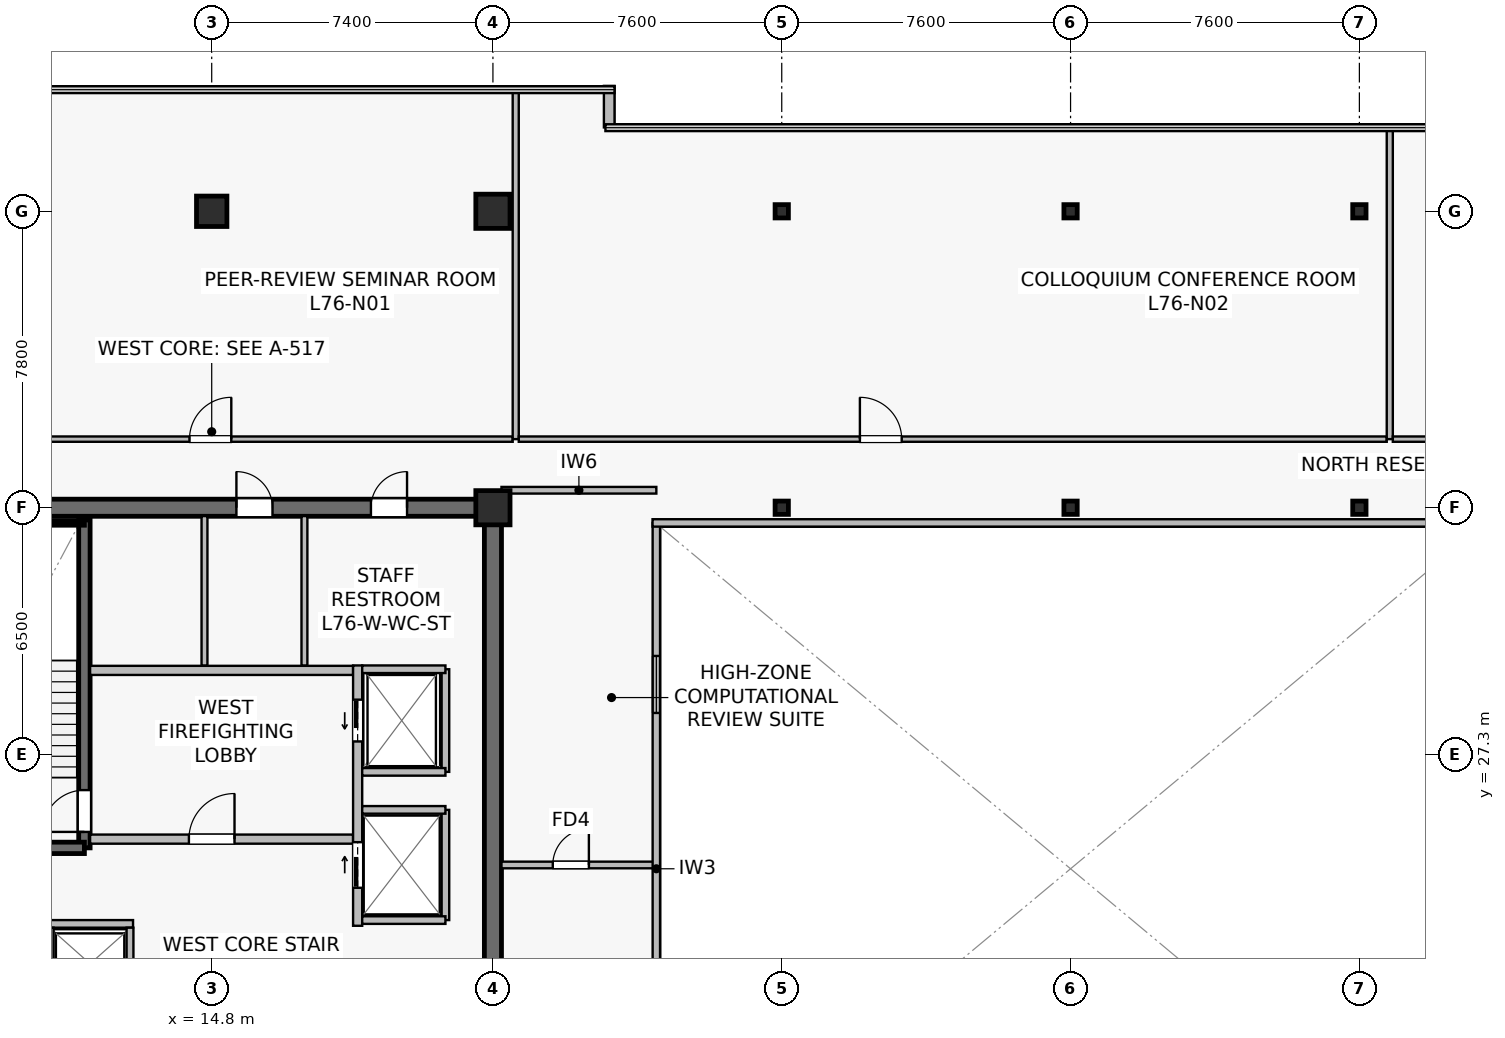
"""IFC4 building model, lengths in metres.
Left out: names, types, materials, properties, quantities, classifications, styles, units other than length and angle.
Written with IfcOpenShell. Run it as: python <this file> out.ifc"""

import sys

from ifc_helpers import new_model, si_unit, direction, frame, frame_2d, origin, origin_2d, place, context, subcontext, project, spatial, rectangle, i_section, extrude, source, transform, mapped, element, fill, save


model = new_model("IFC4")
c1 = context("Model", 3, precision=1e-05, world=origin(), true_north=direction((0.0, 1.0)))
c2 = subcontext(c1, "Body", "Model", "MODEL_VIEW")
j1 = project(units=[si_unit("LENGTHUNIT", "METRE"), si_unit("PLANEANGLEUNIT", "RADIAN")], contexts=[c1])
p1 = place(None, origin())
s1 = spatial("IfcSite", under=j1, at=p1, CompositionType="ELEMENT")
p2 = place(p1, origin())
s2 = spatial("IfcBuilding", under=s1, at=p2, CompositionType="ELEMENT")
p3 = place(p2, frame((0.0, 0.0, 318.6)))
s3 = spatial("IfcBuildingStorey", under=s2, at=p3, CompositionType="ELEMENT", Elevation=318.6)
p4 = place(p3, frame((7.175, 33.8, 0.0), z_axis=(0.0, 0.0, 1.0), x_axis=(1.0, 0.0, 0.0)))
e1 = element("IfcWall", 1, at=p4, inside=s3, PredefinedType="SHEAR", context=c2, shape_type="SweptSolid", body=[
    extrude(rectangle(XDim=15.25, YDim=0.45, at=frame_2d((7.625, 0.0))), origin(), (0.0, 0.0, 1.0), 3.9),
])
p5 = place(p4, frame((8.275, 0.0, 0.0)))
e2 = element("IfcOpeningElement", 2, at=p5, cuts=e1, PredefinedType="OPENING", context=c2, shape_type="SweptSolid", body=[
    extrude(rectangle(XDim=0.95, YDim=2.15, at=frame_2d((0.475, 1.075))), frame((0.0, 0.235, 0.0), z_axis=(0.0, -1.0, 0.0), x_axis=(1.0, 0.0, 0.0)), (0.0, 0.0, 1.0), 0.47),
])
p6 = place(p4, frame((11.815, 0.0, 0.0)))
e3 = element("IfcOpeningElement", 3, at=p6, cuts=e1, PredefinedType="OPENING", context=c2, shape_type="SweptSolid", body=[
    extrude(rectangle(XDim=0.95, YDim=2.15, at=frame_2d((0.475, 1.075))), frame((0.0, 0.235, 0.0), z_axis=(0.0, -1.0, 0.0), x_axis=(1.0, 0.0, 0.0)), (0.0, 0.0, 1.0), 0.47),
])
p7 = place(p3, frame((22.2, 15.025, 0.0), z_axis=(0.0, 0.0, 1.0), x_axis=(0.0, 1.0, 0.0)))
e4 = element("IfcWall", 4, at=p7, inside=s3, PredefinedType="SHEAR", context=c2, shape_type="SweptSolid", body=[
    extrude(rectangle(XDim=18.55, YDim=0.45, at=frame_2d((9.275, 0.0))), origin(), (0.0, 0.0, 1.0), 3.9),
])
p8 = place(p7, frame((3.525, 0.0, 0.0)))
e5 = element("IfcOpeningElement", 5, at=p8, cuts=e4, PredefinedType="OPENING", context=c2, shape_type="SweptSolid", body=[
    extrude(rectangle(XDim=1.42, YDim=2.2, at=frame_2d((0.71, 1.1))), frame((0.0, 0.235, 0.0), z_axis=(0.0, -1.0, 0.0), x_axis=(1.0, 0.0, 0.0)), (0.0, 0.0, 1.0), 0.47),
])
p9 = place(p3, frame((11.45, 24.85, 0.0), z_axis=(0.0, 0.0, 1.0), x_axis=(0.0, 1.0, 0.0)))
e6 = element("IfcWall", 6, at=p9, inside=s3, PredefinedType="SHEAR", context=c2, shape_type="SweptSolid", body=[
    extrude(rectangle(XDim=8.63, YDim=0.3, at=frame_2d((4.315, 0.0))), origin(), (0.0, 0.0, 1.0), 3.9),
])
p10 = place(p9, frame((0.42, 0.0, 0.0)))
e7 = element("IfcOpeningElement", 7, at=p10, cuts=e6, PredefinedType="OPENING", context=c2, shape_type="SweptSolid", body=[
    extrude(rectangle(XDim=1.1, YDim=2.15, at=frame_2d((0.55, 1.075))), frame((0.0, 0.16, 0.0), z_axis=(0.0, -1.0, 0.0), x_axis=(1.0, 0.0, 0.0)), (0.0, 0.0, 1.0), 0.32),
])
p11 = place(p3, frame((7.65, 24.85, 0.0), z_axis=(0.0, 0.0, 1.0), x_axis=(1.0, 0.0, 0.0)))
e8 = element("IfcWall", 8, at=p11, inside=s3, PredefinedType="SHEAR", context=c2, shape_type="SweptSolid", body=[
    extrude(rectangle(XDim=3.8, YDim=0.3, at=frame_2d((1.9, 0.0))), origin(), (0.0, 0.0, 1.0), 3.9),
])
p12 = place(p3, frame((7.73, 33.4, 0.0), z_axis=(0.0, 0.0, 1.0), x_axis=(1.0, 0.0, 0.0)))
e9 = element("IfcWall", 9, at=p12, inside=s3, PredefinedType="SOLIDWALL", context=c2, shape_type="SweptSolid", body=[
    extrude(rectangle(XDim=3.72, YDim=0.12, at=frame_2d((1.86, 0.0))), origin(), (0.0, 0.0, 1.0), 3.9),
])
m1 = source(origin(), c2, "Body", "SweptSolid", [
    extrude(rectangle(XDim=0.9, YDim=0.9, at=origin_2d()), origin(), (0.0, 0.0, 1.0), 4.2),
])
p13 = place(p3, frame((22.2, 33.8, 0.0), z_axis=(0.0, 0.0, 1.0), x_axis=(1.0, 0.0, 0.0)))
e10 = element("IfcColumn", 10, at=p13, inside=s3, PredefinedType="COLUMN", context=c2, shape_type="MappedRepresentation", body=[
    mapped(m1, transform((0.0, 0.0, 0.0), scale=1.0)),
])
m2 = source(origin(), c2, "Body", "SweptSolid", [
    extrude(rectangle(XDim=0.8, YDim=0.8, at=origin_2d()), origin(), (0.0, 0.0, 1.0), 4.2),
])
p14 = place(p3, frame((14.8, 41.6, 0.0), z_axis=(0.0, 0.0, 1.0), x_axis=(1.0, 0.0, 0.0)))
e11 = element("IfcColumn", 11, at=p14, inside=s3, PredefinedType="COLUMN", context=c2, shape_type="MappedRepresentation", body=[
    mapped(m2, transform((0.0, 0.0, 0.0), scale=1.0)),
])
p15 = place(p3, frame((22.2, 41.6, 0.0), z_axis=(0.0, 0.0, 1.0), x_axis=(1.0, 0.0, 0.0)))
e12 = element("IfcColumn", 12, at=p15, inside=s3, PredefinedType="COLUMN", context=c2, shape_type="MappedRepresentation", body=[
    mapped(m1, transform((0.0, 0.0, 0.0), scale=1.0)),
])
m3 = source(origin(), c2, "Body", "SweptSolid", [
    extrude(i_section(OverallWidth=0.35, OverallDepth=0.35, WebThickness=0.012, FlangeThickness=0.019, at=origin_2d()), origin(), (0.0, 0.0, 1.0), 4.2),
])
for number, where, z_axis, x_axis in (
    (13, (29.8, 33.8, 0.0), (0.0, 0.0, 1.0), (1.0, 0.0, 0.0)),
    (14, (29.8, 41.6, 0.0), (0.0, 0.0, 1.0), (1.0, 0.0, 0.0)),
    (15, (37.4, 33.8, 0.0), (0.0, 0.0, 1.0), (1.0, 0.0, 0.0)),
    (16, (37.4, 41.6, 0.0), (0.0, 0.0, 1.0), (1.0, 0.0, 0.0)),
    (17, (45.0, 33.8, 0.0), (0.0, 0.0, 1.0), (1.0, 0.0, 0.0)),
    (18, (45.0, 41.6, 0.0), (0.0, 0.0, 1.0), (1.0, 0.0, 0.0)),
):
    element("IfcColumn", number, at=place(p3, frame(where, z_axis=z_axis, x_axis=x_axis)), inside=s3, PredefinedType="COLUMN", context=c2, shape_type="MappedRepresentation", body=[
        mapped(m3, transform((0.0, 0.0, 0.0), scale=1.0)),
    ])
p16 = place(p3, frame((25.26, 43.807, 0.0), z_axis=(0.0, 0.0, 1.0), x_axis=(0.0, 1.0, 0.0)))
e19 = element("IfcWall", 19, at=p16, inside=s3, PredefinedType="STANDARD", context=c2, shape_type="SweptSolid", body=[
    extrude(rectangle(XDim=1.093, YDim=0.28, at=frame_2d((0.546, 0.0))), origin(), (0.0, 0.0, 1.0), 3.9),
])
p17 = place(p3, frame((11.6, 25.08, 0.0), z_axis=(0.0, 0.0, 1.0), x_axis=(1.0, 0.0, 0.0)))
e20 = element("IfcWall", 20, at=p17, inside=s3, PredefinedType="SOLIDWALL", context=c2, shape_type="SweptSolid", body=[
    extrude(rectangle(XDim=6.92, YDim=0.24, at=frame_2d((3.46, 0.0))), origin(), (0.0, 0.0, 1.0), 3.297),
])
p18 = place(p17, frame((2.6, 0.0, 0.0)))
e21 = element("IfcOpeningElement", 21, at=p18, cuts=e20, PredefinedType="OPENING", context=c2, shape_type="SweptSolid", body=[
    extrude(rectangle(XDim=1.2, YDim=2.16, at=frame_2d((0.6, 1.08))), frame((0.0, 0.13, 0.0), z_axis=(0.0, -1.0, 0.0), x_axis=(1.0, 0.0, 0.0)), (0.0, 0.0, 1.0), 0.26),
])
p19 = place(p3, frame((11.6, 29.52, 0.0), z_axis=(0.0, 0.0, 1.0), x_axis=(1.0, 0.0, 0.0)))
e22 = element("IfcWall", 22, at=p19, inside=s3, PredefinedType="SOLIDWALL", context=c2, shape_type="SweptSolid", body=[
    extrude(rectangle(XDim=6.92, YDim=0.24, at=frame_2d((3.46, 0.0))), origin(), (0.0, 0.0, 1.0), 3.297),
])
p20 = place(p3, frame((18.64, 22.8, 0.0), z_axis=(0.0, 0.0, 1.0), x_axis=(0.0, 1.0, 0.0)))
e23 = element("IfcWall", 23, at=p20, inside=s3, PredefinedType="SOLIDWALL", context=c2, shape_type="SweptSolid", body=[
    extrude(rectangle(XDim=6.85, YDim=0.24, at=frame_2d((3.425, 0.0))), origin(), (0.0, 0.0, 1.0), 3.035),
])
p21 = place(p20, frame((4.85, 0.0, 0.0)))
e24 = element("IfcOpeningElement", 24, at=p21, cuts=e23, PredefinedType="OPENING", context=c2, shape_type="SweptSolid", body=[
    extrude(rectangle(XDim=1.1, YDim=2.22, at=frame_2d((0.55, 1.11))), frame((0.0, 0.13, 0.0), z_axis=(0.0, -1.0, 0.0), x_axis=(1.0, 0.0, 0.0)), (0.0, 0.0, 1.0), 0.26),
])
p22 = place(p20, frame((1.0, 0.0, 0.0)))
e25 = element("IfcOpeningElement", 25, at=p22, cuts=e23, PredefinedType="OPENING", context=c2, shape_type="SweptSolid", body=[
    extrude(rectangle(XDim=1.2, YDim=2.22, at=frame_2d((0.6, 1.11))), frame((0.0, 0.13, 0.0), z_axis=(0.0, -1.0, 0.0), x_axis=(1.0, 0.0, 0.0)), (0.0, 0.0, 1.0), 0.26),
])
p23 = place(p3, frame((10.47, 22.85, 0.0), z_axis=(0.0, 0.0, 1.0), x_axis=(1.0, 0.0, 0.0)))
e26 = element("IfcWall", 26, at=p23, inside=s3, PredefinedType="SOLIDWALL", context=c2, shape_type="SweptSolid", body=[
    extrude(rectangle(XDim=2.26, YDim=0.2, at=frame_2d((1.13, 0.0))), origin(), (0.0, 0.0, 1.0), 3.9),
])
for number, where, z_axis, x_axis in (
    (27, (10.55, 20.85, 0.0), (0.0, 0.0, 1.0), (0.0, 1.0, 0.0)),
    (28, (12.65, 20.85, 0.0), (0.0, 0.0, 1.0), (0.0, 1.0, 0.0)),
):
    element("IfcWall", number, at=place(p3, frame(where, z_axis=z_axis, x_axis=x_axis)), inside=s3, PredefinedType="SOLIDWALL", context=c2, shape_type="SweptSolid", body=[
        extrude(rectangle(XDim=1.9, YDim=0.18, at=frame_2d((0.95, 0.0))), origin(), (0.0, 0.0, 1.0), 3.9),
    ])
p24 = place(p3, frame((20.95, 26.85, 0.0), z_axis=(0.0, 0.0, 1.0), x_axis=(0.0, 1.0, 0.0)))
e29 = element("IfcWall", 29, at=p24, inside=s3, PredefinedType="SOLIDWALL", context=c2, shape_type="SweptSolid", body=[
    extrude(rectangle(XDim=2.7, YDim=0.2, at=frame_2d((1.35, 0.0))), origin(), (0.0, 0.0, 1.0), 3.9),
])
p25 = place(p3, frame((18.76, 29.55, 0.0), z_axis=(0.0, 0.0, 1.0), x_axis=(1.0, 0.0, 0.0)))
e30 = element("IfcWall", 30, at=p25, inside=s3, PredefinedType="SOLIDWALL", context=c2, shape_type="SweptSolid", body=[
    extrude(rectangle(XDim=2.19, YDim=0.2, at=frame_2d((1.095, 0.0))), origin(), (0.0, 0.0, 1.0), 3.9),
])
p26 = place(p3, frame((18.76, 26.85, 0.0), z_axis=(0.0, 0.0, 1.0), x_axis=(1.0, 0.0, 0.0)))
e31 = element("IfcWall", 31, at=p26, inside=s3, PredefinedType="SOLIDWALL", context=c2, shape_type="SweptSolid", body=[
    extrude(rectangle(XDim=2.19, YDim=0.2, at=frame_2d((1.095, 0.0))), origin(), (0.0, 0.0, 1.0), 3.297),
])
p27 = place(p3, frame((20.95, 22.95, 0.0), z_axis=(0.0, 0.0, 1.0), x_axis=(0.0, 1.0, 0.0)))
e32 = element("IfcWall", 32, at=p27, inside=s3, PredefinedType="SOLIDWALL", context=c2, shape_type="SweptSolid", body=[
    extrude(rectangle(XDim=2.9, YDim=0.2, at=frame_2d((1.45, 0.0))), origin(), (0.0, 0.0, 1.0), 3.035),
])
for number, where, z_axis, x_axis in (
    (33, (18.76, 25.85, 0.0), (0.0, 0.0, 1.0), (1.0, 0.0, 0.0)),
    (34, (18.76, 22.95, 0.0), (0.0, 0.0, 1.0), (1.0, 0.0, 0.0)),
):
    element("IfcWall", number, at=place(p3, frame(where, z_axis=z_axis, x_axis=x_axis)), inside=s3, PredefinedType="SOLIDWALL", context=c2, shape_type="SweptSolid", body=[
        extrude(rectangle(XDim=2.19, YDim=0.2, at=frame_2d((1.095, 0.0))), origin(), (0.0, 0.0, 1.0), 3.9),
    ])
p28 = place(p3, frame((14.61, 29.65, 0.0), z_axis=(0.0, 0.0, 1.0), x_axis=(0.0, 1.0, 0.0)))
e35 = element("IfcWall", 35, at=p28, inside=s3, PredefinedType="PLUMBINGWALL", context=c2, shape_type="SweptSolid", body=[
    extrude(rectangle(XDim=3.93, YDim=0.155, at=frame_2d((1.965, 0.0))), origin(), (0.0, 0.0, 1.0), 3.297),
])
p29 = place(p3, frame((17.24, 29.65, 0.0), z_axis=(0.0, 0.0, 1.0), x_axis=(0.0, 1.0, 0.0)))
e36 = element("IfcWall", 36, at=p29, inside=s3, PredefinedType="PLUMBINGWALL", context=c2, shape_type="SweptSolid", body=[
    extrude(rectangle(XDim=3.93, YDim=0.155, at=frame_2d((1.965, 0.0))), origin(), (0.0, 0.0, 1.0), 3.9),
])
p30 = place(p3, frame((22.425, 34.26, 0.0), z_axis=(0.0, 0.0, 1.0), x_axis=(1.0, 0.0, 0.0)))
e37 = element("IfcWall", 37, at=p30, inside=s3, PredefinedType="PARTITIONING", context=c2, shape_type="SweptSolid", body=[
    extrude(rectangle(XDim=4.075, YDim=0.175, at=frame_2d((2.038, 0.0))), origin(), (0.0, 0.0, 1.0), 3.635),
])
p31 = place(p3, frame((22.425, 24.4, 0.0), z_axis=(0.0, 0.0, 1.0), x_axis=(1.0, 0.0, 0.0)))
e38 = element("IfcWall", 38, at=p31, inside=s3, PredefinedType="PARTITIONING", context=c2, shape_type="SweptSolid", body=[
    extrude(rectangle(XDim=4.075, YDim=0.175, at=frame_2d((2.038, 0.0))), origin(), (0.0, 0.0, 1.0), 3.9),
])
p32 = place(p31, frame((1.35, 0.0, 0.0)))
e39 = element("IfcOpeningElement", 39, at=p32, cuts=e38, PredefinedType="OPENING", context=c2, shape_type="SweptSolid", body=[
    extrude(rectangle(XDim=0.95, YDim=2.15, at=frame_2d((0.475, 1.075))), frame((0.0, 0.098, 0.0), z_axis=(0.0, -1.0, 0.0), x_axis=(1.0, 0.0, 0.0)), (0.0, 0.0, 1.0), 0.195),
])
p33 = place(p3, frame((26.5, 15.2, 0.0), z_axis=(0.0, 0.0, 1.0), x_axis=(0.0, 1.0, 0.0)))
e40 = element("IfcWall", 40, at=p33, inside=s3, PredefinedType="SOLIDWALL", context=c2, shape_type="SweptSolid", body=[
    extrude(rectangle(XDim=18.2, YDim=0.195, at=frame_2d((9.1, 0.0))), origin(), (0.0, 0.0, 1.0), 3.9),
])
p34 = place(p33, frame((1.8, 0.0, 0.9)))
e41 = element("IfcOpeningElement", 41, at=p34, cuts=e40, PredefinedType="OPENING", context=c2, shape_type="SweptSolid", body=[
    extrude(rectangle(XDim=1.5, YDim=1.4, at=frame_2d((0.75, 0.7))), frame((0.0, 0.107, 0.0), z_axis=(0.0, -1.0, 0.0), x_axis=(1.0, 0.0, 0.0)), (0.0, 0.0, 1.0), 0.215),
])
p35 = place(p33, frame((13.2, 0.0, 0.9)))
e42 = element("IfcOpeningElement", 42, at=p35, cuts=e40, PredefinedType="OPENING", context=c2, shape_type="SweptSolid", body=[
    extrude(rectangle(XDim=1.5, YDim=1.4, at=frame_2d((0.75, 0.7))), frame((0.0, 0.107, 0.0), z_axis=(0.0, -1.0, 0.0), x_axis=(1.0, 0.0, 0.0)), (0.0, 0.0, 1.0), 0.215),
])
p36 = place(p3, frame((26.4, 33.4, 0.0), z_axis=(0.0, 0.0, 1.0), x_axis=(1.0, 0.0, 0.0)))
e43 = element("IfcWall", 43, at=p36, inside=s3, PredefinedType="SOLIDWALL", context=c2, shape_type="SweptSolid", body=[
    extrude(rectangle(XDim=22.0, YDim=0.195, at=frame_2d((11.0, 0.0))), origin(), (0.0, 0.0, 1.0), 3.9),
])
p37 = place(p3, frame((5.91, 35.605, 0.0), z_axis=(0.0, 0.0, 1.0), x_axis=(1.0, 0.0, 0.0)))
e44 = element("IfcWall", 44, at=p37, inside=s3, PredefinedType="PARTITIONING", context=c2, shape_type="SweptSolid", body=[
    extrude(rectangle(XDim=16.81, YDim=0.14, at=frame_2d((8.405, 0.0))), origin(), (0.0, 0.0, 1.0), 3.297),
])
p38 = place(p37, frame((8.305, 0.0, 0.0)))
e45 = element("IfcOpeningElement", 45, at=p38, cuts=e44, PredefinedType="OPENING", context=c2, shape_type="SweptSolid", body=[
    extrude(rectangle(XDim=1.1, YDim=2.18, at=frame_2d((0.55, 1.09))), frame((0.0, 0.08, 0.0), z_axis=(0.0, -1.0, 0.0), x_axis=(1.0, 0.0, 0.0)), (0.0, 0.0, 1.0), 0.16),
])
p39 = place(p3, frame((22.8, 35.605, 0.0), z_axis=(0.0, 0.0, 1.0), x_axis=(0.0, 1.0, 0.0)))
e46 = element("IfcWall", 46, at=p39, inside=s3, PredefinedType="PARTITIONING", context=c2, shape_type="SweptSolid", body=[
    extrude(rectangle(XDim=9.185, YDim=0.16, at=frame_2d((4.593, 0.0))), origin(), (0.0, 0.0, 1.0), 3.235),
])
p40 = place(p3, frame((22.88, 35.605, 0.0), z_axis=(0.0, 0.0, 1.0), x_axis=(1.0, 0.0, 0.0)))
e47 = element("IfcWall", 47, at=p40, inside=s3, PredefinedType="PARTITIONING", context=c2, shape_type="SweptSolid", body=[
    extrude(rectangle(XDim=22.84, YDim=0.14, at=frame_2d((11.42, 0.0))), origin(), (0.0, 0.0, 1.0), 3.297),
])
p41 = place(p40, frame((8.976, 0.0, 0.0)))
e48 = element("IfcOpeningElement", 48, at=p41, cuts=e47, PredefinedType="OPENING", context=c2, shape_type="SweptSolid", body=[
    extrude(rectangle(XDim=1.1, YDim=2.18, at=frame_2d((0.55, 1.09))), frame((0.0, 0.08, 0.0), z_axis=(0.0, -1.0, 0.0), x_axis=(1.0, 0.0, 0.0)), (0.0, 0.0, 1.0), 0.16),
])
p42 = place(p3, frame((45.8, 35.605, 0.0), z_axis=(0.0, 0.0, 1.0), x_axis=(0.0, 1.0, 0.0)))
e49 = element("IfcWall", 49, at=p42, inside=s3, PredefinedType="PARTITIONING", context=c2, shape_type="SweptSolid", body=[
    extrude(rectangle(XDim=8.185, YDim=0.16, at=frame_2d((4.093, 0.0))), origin(), (0.0, 0.0, 1.0), 3.235),
])
p43 = place(p3, frame((45.88, 35.605, 0.0), z_axis=(0.0, 0.0, 1.0), x_axis=(1.0, 0.0, 0.0)))
e50 = element("IfcWall", 50, at=p43, inside=s3, PredefinedType="PARTITIONING", context=c2, shape_type="SweptSolid", body=[
    extrude(rectangle(XDim=23.01, YDim=0.14, at=frame_2d((11.505, 0.0))), origin(), (0.0, 0.0, 1.0), 3.297),
])
p44 = place(p43, frame((11.591, 0.0, 0.0)))
e51 = element("IfcOpeningElement", 51, at=p44, cuts=e50, PredefinedType="OPENING", context=c2, shape_type="SweptSolid", body=[
    extrude(rectangle(XDim=1.1, YDim=2.18, at=frame_2d((0.55, 1.09))), frame((0.0, 0.08, 0.0), z_axis=(0.0, -1.0, 0.0), x_axis=(1.0, 0.0, 0.0)), (0.0, 0.0, 1.0), 0.16),
])
m4 = source(origin(), c2, "Body", "SweptSolid", [
    extrude(rectangle(XDim=1.5, YDim=1.4, at=frame_2d((0.75, 0.7))), frame((0.0, 0.03, 0.0), z_axis=(0.0, -1.0, 0.0), x_axis=(1.0, 0.0, 0.0)), (0.0, 0.0, 1.0), 0.06),
])
p45 = place(p35, origin())
e52 = element("IfcWindow", 52, at=p45, inside=s3, PartitioningType="SINGLE_PANEL", PredefinedType="WINDOW", context=c2, shape_type="MappedRepresentation", body=[
    mapped(m4, transform((0.0, 0.0, 0.0), scale=1.0)),
])
fill(e42, e52)
m5 = source(origin(), c2, "Body", "SweptSolid", [
    extrude(rectangle(XDim=1.1, YDim=2.15, at=frame_2d((0.55, 1.075))), frame((0.0, 0.025, 0.0), z_axis=(0.0, -1.0, 0.0), x_axis=(1.0, 0.0, 0.0)), (0.0, 0.0, 1.0), 0.05),
])
p46 = place(p10, origin())
e53 = element("IfcDoor", 53, at=p46, inside=s3, OperationType="SINGLE_SWING_LEFT", PredefinedType="DOOR", context=c2, shape_type="MappedRepresentation", body=[
    mapped(m5, transform((0.0, 0.0, 0.0), scale=1.0)),
])
fill(e7, e53)
m6 = source(origin(), c2, "Body", "SweptSolid", [
    extrude(rectangle(XDim=1.2, YDim=2.16, at=frame_2d((0.6, 1.08))), frame((0.0, 0.025, 0.0), z_axis=(0.0, -1.0, 0.0), x_axis=(1.0, 0.0, 0.0)), (0.0, 0.0, 1.0), 0.05),
])
p47 = place(p18, origin())
e54 = element("IfcDoor", 54, at=p47, inside=s3, OperationType="SINGLE_SWING_RIGHT", PredefinedType="DOOR", context=c2, shape_type="MappedRepresentation", body=[
    mapped(m6, transform((0.0, 0.0, 0.0), scale=1.0)),
])
fill(e21, e54)
m7 = source(origin(), c2, "Body", "SweptSolid", [
    extrude(rectangle(XDim=1.1, YDim=2.22, at=frame_2d((0.55, 1.11))), frame((0.0, 0.025, 0.0), z_axis=(0.0, -1.0, 0.0), x_axis=(1.0, 0.0, 0.0)), (0.0, 0.0, 1.0), 0.05),
])
p48 = place(p21, origin())
e55 = element("IfcDoor", 55, at=p48, inside=s3, OperationType="SLIDING_TO_LEFT", PredefinedType="USERDEFINED", context=c2, shape_type="MappedRepresentation", body=[
    mapped(m7, transform((0.0, 0.0, 0.0), scale=1.0)),
])
fill(e24, e55)
m8 = source(origin(), c2, "Body", "SweptSolid", [
    extrude(rectangle(XDim=1.2, YDim=2.22, at=frame_2d((0.6, 1.11))), frame((0.0, 0.025, 0.0), z_axis=(0.0, -1.0, 0.0), x_axis=(1.0, 0.0, 0.0)), (0.0, 0.0, 1.0), 0.05),
])
p49 = place(p22, origin())
e56 = element("IfcDoor", 56, at=p49, inside=s3, OperationType="SLIDING_TO_RIGHT", PredefinedType="USERDEFINED", context=c2, shape_type="MappedRepresentation", body=[
    mapped(m8, transform((0.0, 0.0, 0.0), scale=1.0)),
])
fill(e25, e56)
m9 = source(origin(), c2, "Body", "SweptSolid", [
    extrude(rectangle(XDim=0.95, YDim=2.15, at=frame_2d((0.475, 1.075))), frame((0.0, 0.025, 0.0), z_axis=(0.0, -1.0, 0.0), x_axis=(1.0, 0.0, 0.0)), (0.0, 0.0, 1.0), 0.05),
])
p50 = place(p5, origin())
e57 = element("IfcDoor", 57, at=p50, inside=s3, OperationType="SINGLE_SWING_LEFT", PredefinedType="DOOR", context=c2, shape_type="MappedRepresentation", body=[
    mapped(m9, transform((0.0, 0.0, 0.0), scale=1.0)),
])
fill(e2, e57)
p51 = place(p6, origin())
e58 = element("IfcDoor", 58, at=p51, inside=s3, OperationType="SINGLE_SWING_RIGHT", PredefinedType="DOOR", context=c2, shape_type="MappedRepresentation", body=[
    mapped(m9, transform((0.0, 0.0, 0.0), scale=1.0)),
])
fill(e3, e58)
p52 = place(p32, origin())
e59 = element("IfcDoor", 59, at=p52, inside=s3, OperationType="SINGLE_SWING_RIGHT", PredefinedType="DOOR", context=c2, shape_type="MappedRepresentation", body=[
    mapped(m9, transform((0.0, 0.0, 0.0), scale=1.0)),
])
fill(e39, e59)
m10 = source(origin(), c2, "Body", "SweptSolid", [
    extrude(rectangle(XDim=1.1, YDim=2.18, at=frame_2d((0.55, 1.09))), frame((0.0, 0.025, 0.0), z_axis=(0.0, -1.0, 0.0), x_axis=(1.0, 0.0, 0.0)), (0.0, 0.0, 1.0), 0.05),
])
p53 = place(p38, origin())
e60 = element("IfcDoor", 60, at=p53, inside=s3, OperationType="SINGLE_SWING_RIGHT", PredefinedType="DOOR", context=c2, shape_type="MappedRepresentation", body=[
    mapped(m10, transform((0.0, 0.0, 0.0), scale=1.0)),
])
fill(e45, e60)
p54 = place(p41, origin())
e61 = element("IfcDoor", 61, at=p54, inside=s3, OperationType="SINGLE_SWING_LEFT", PredefinedType="DOOR", context=c2, shape_type="MappedRepresentation", body=[
    mapped(m10, transform((0.0, 0.0, 0.0), scale=1.0)),
])
fill(e48, e61)
save(model, sys.argv[1])
